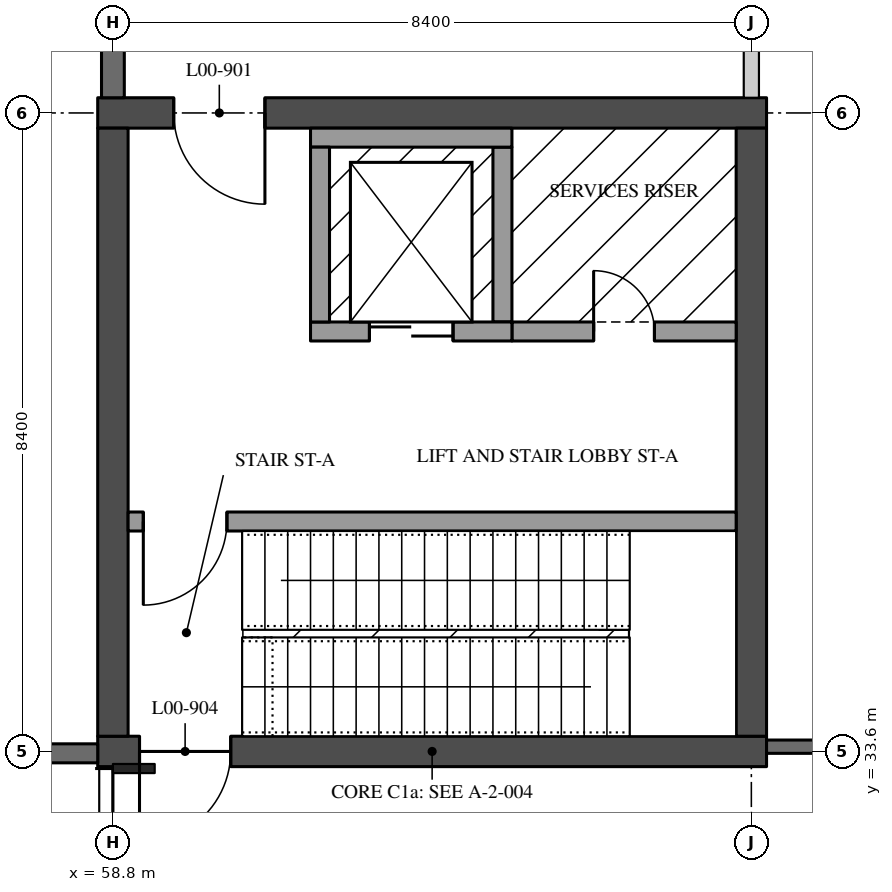
"""IFC4 building model, lengths in metres.
Left out: names, types, materials, properties, quantities, classifications, styles, units other than length and angle.
Written with IfcOpenShell. Run it as: python <this file> out.ifc"""

import sys

from ifc_helpers import new_model, si_unit, direction, frame, frame_2d, origin, place, context, subcontext, project, spatial, rectangle, extrude, element, fill, save


model = new_model("IFC4")
c1 = context("Model", 3, precision=1e-05, world=origin(), true_north=direction((0.0, 1.0)))
c2 = subcontext(c1, "Body", "Model", "MODEL_VIEW")
j1 = project(units=[si_unit("LENGTHUNIT", "METRE"), si_unit("PLANEANGLEUNIT", "RADIAN")], contexts=[c1])
p1 = place(None, origin())
s1 = spatial("IfcSite", under=j1, at=p1, CompositionType="ELEMENT")
p2 = place(p1, origin())
s2 = spatial("IfcBuilding", under=s1, at=p2, CompositionType="ELEMENT")
p3 = place(p2, origin())
s3 = spatial("IfcBuildingStorey", under=s2, at=p3, CompositionType="ELEMENT", Elevation=0.0)
p4 = place(p3, frame((58.6, 33.6, 0.0), z_axis=(0.0, 0.0, 1.0), x_axis=(1.0, 0.0, 0.0)))
e1 = element("IfcWall", 1, at=p4, inside=s3, PredefinedType="SHEAR", context=c2, shape_type="SweptSolid", body=[
    extrude(rectangle(XDim=8.8, YDim=0.4, at=frame_2d((4.4, 0.0))), origin(), (0.0, 0.0, 1.0), 5.05),
])
p5 = place(p4, frame((0.55, 0.0, 0.0)))
e2 = element("IfcOpeningElement", 2, at=p5, cuts=e1, PredefinedType="OPENING", context=c2, shape_type="SweptSolid", body=[
    extrude(rectangle(XDim=1.2, YDim=2.1, at=frame_2d((0.6, 1.05))), frame((0.0, 0.21, 0.0), z_axis=(0.0, -1.0, 0.0), x_axis=(1.0, 0.0, 0.0)), (0.0, 0.0, 1.0), 0.42),
])
p6 = place(p3, frame((58.6, 42.0, 0.0), z_axis=(0.0, 0.0, 1.0), x_axis=(1.0, 0.0, 0.0)))
e3 = element("IfcWall", 3, at=p6, inside=s3, PredefinedType="SHEAR", context=c2, shape_type="SweptSolid", body=[
    extrude(rectangle(XDim=8.8, YDim=0.4, at=frame_2d((4.4, 0.0))), origin(), (0.0, 0.0, 1.0), 5.05),
])
p7 = place(p6, frame((1.0, 0.0, 0.0)))
e4 = element("IfcOpeningElement", 4, at=p7, cuts=e3, PredefinedType="OPENING", context=c2, shape_type="SweptSolid", body=[
    extrude(rectangle(XDim=1.2, YDim=2.1, at=frame_2d((0.6, 1.05))), frame((0.0, 0.21, 0.0), z_axis=(0.0, -1.0, 0.0), x_axis=(1.0, 0.0, 0.0)), (0.0, 0.0, 1.0), 0.42),
])
for number, where, z_axis, x_axis in (
    (5, (58.8, 33.8, 0.0), (0.0, 0.0, 1.0), (0.0, 1.0, 0.0)),
    (6, (67.2, 33.8, 0.0), (0.0, 0.0, 1.0), (0.0, 1.0, 0.0)),
):
    element("IfcWall", number, at=place(p3, frame(where, z_axis=z_axis, x_axis=x_axis)), inside=s3, PredefinedType="SHEAR", context=c2, shape_type="SweptSolid", body=[
        extrude(rectangle(XDim=8.0, YDim=0.4, at=frame_2d((4.0, 0.0))), origin(), (0.0, 0.0, 1.0), 5.05),
    ])
p8 = place(p3, frame((59.0, 36.625, 0.0), z_axis=(0.0, 0.0, 1.0), x_axis=(1.0, 0.0, 0.0)))
e7 = element("IfcWall", 7, at=p8, inside=s3, PredefinedType="SOLIDWALL", context=c2, shape_type="SweptSolid", body=[
    extrude(rectangle(XDim=8.0, YDim=0.25, at=frame_2d((4.0, 0.0))), origin(), (0.0, 0.0, 1.0), 5.05),
])
p9 = place(p8, frame((0.2, 0.0, 0.0)))
e8 = element("IfcOpeningElement", 8, at=p9, cuts=e7, PredefinedType="OPENING", context=c2, shape_type="SweptSolid", body=[
    extrude(rectangle(XDim=1.1, YDim=2.1, at=frame_2d((0.55, 1.05))), frame((0.0, 0.135, 0.0), z_axis=(0.0, -1.0, 0.0), x_axis=(1.0, 0.0, 0.0)), (0.0, 0.0, 1.0), 0.27),
])
p10 = place(p3, frame((64.05, 39.125, 0.0), z_axis=(0.0, 0.0, 1.0), x_axis=(1.0, 0.0, 0.0)))
e9 = element("IfcWall", 9, at=p10, inside=s3, PredefinedType="SOLIDWALL", context=c2, shape_type="SweptSolid", body=[
    extrude(rectangle(XDim=2.95, YDim=0.25, at=frame_2d((1.475, 0.0))), origin(), (0.0, 0.0, 1.0), 5.05),
])
p11 = place(p10, frame((1.075, 0.0, 0.0)))
e10 = element("IfcOpeningElement", 10, at=p11, cuts=e9, PredefinedType="OPENING", context=c2, shape_type="SweptSolid", body=[
    extrude(rectangle(XDim=0.8, YDim=2.1, at=frame_2d((0.4, 1.05))), frame((0.0, 0.135, 0.0), z_axis=(0.0, -1.0, 0.0), x_axis=(1.0, 0.0, 0.0)), (0.0, 0.0, 1.0), 0.27),
])
p12 = place(p3, frame((63.925, 39.25, 0.0), z_axis=(0.0, 0.0, 1.0), x_axis=(0.0, 1.0, 0.0)))
e11 = element("IfcWall", 11, at=p12, inside=s3, PredefinedType="SOLIDWALL", context=c2, shape_type="SweptSolid", body=[
    extrude(rectangle(XDim=2.3, YDim=0.25, at=frame_2d((1.15, 0.0))), origin(), (0.0, 0.0, 1.0), 5.05),
])
p13 = place(p3, frame((61.4, 41.675, 0.0), z_axis=(0.0, 0.0, 1.0), x_axis=(1.0, 0.0, 0.0)))
e12 = element("IfcWall", 12, at=p13, inside=s3, PredefinedType="SOLIDWALL", context=c2, shape_type="SweptSolid", body=[
    extrude(rectangle(XDim=2.65, YDim=0.25, at=frame_2d((1.325, 0.0))), origin(), (0.0, 0.0, 1.0), 5.05),
])
p14 = place(p3, frame((61.4, 39.125, 0.0), z_axis=(0.0, 0.0, 1.0), x_axis=(1.0, 0.0, 0.0)))
e13 = element("IfcWall", 13, at=p14, inside=s3, PredefinedType="SOLIDWALL", context=c2, shape_type="SweptSolid", body=[
    extrude(rectangle(XDim=2.65, YDim=0.25, at=frame_2d((1.325, 0.0))), origin(), (0.0, 0.0, 1.0), 5.05),
])
p15 = place(p14, frame((0.775, 0.0, 0.0)))
e14 = element("IfcOpeningElement", 14, at=p15, cuts=e13, PredefinedType="OPENING", context=c2, shape_type="SweptSolid", body=[
    extrude(rectangle(XDim=1.1, YDim=2.1, at=frame_2d((0.55, 1.05))), frame((0.0, 0.135, 0.0), z_axis=(0.0, -1.0, 0.0), x_axis=(1.0, 0.0, 0.0)), (0.0, 0.0, 1.0), 0.27),
])
p16 = place(p3, frame((61.525, 39.25, 0.0), z_axis=(0.0, 0.0, 1.0), x_axis=(0.0, 1.0, 0.0)))
e15 = element("IfcWall", 15, at=p16, inside=s3, PredefinedType="SOLIDWALL", context=c2, shape_type="SweptSolid", body=[
    extrude(rectangle(XDim=2.3, YDim=0.25, at=frame_2d((1.15, 0.0))), origin(), (0.0, 0.0, 1.0), 5.05),
])
p17 = place(p3, frame((67.2, 42.2, 0.0), z_axis=(0.0, 0.0, 1.0), x_axis=(0.0, 1.0, 0.0)))
e16 = element("IfcWall", 16, at=p17, inside=s3, PredefinedType="PARTITIONING", context=c2, shape_type="SweptSolid", body=[
    extrude(rectangle(XDim=4.0, YDim=0.2, at=frame_2d((2.0, 0.0))), origin(), (0.0, 0.0, 1.0), 18.77),
])
p18 = place(p17, frame((1.5, 0.0, 0.0)))
e17 = element("IfcOpeningElement", 17, at=p18, cuts=e16, PredefinedType="OPENING", context=c2, shape_type="SweptSolid", body=[
    extrude(rectangle(XDim=1.0, YDim=2.4, at=frame_2d((0.5, 1.2))), frame((0.0, 0.11, 0.0), z_axis=(0.0, -1.0, 0.0), x_axis=(1.0, 0.0, 0.0)), (0.0, 0.0, 1.0), 0.22),
])
p19 = place(p3, frame((58.6, 33.575, 0.0), z_axis=(0.0, 0.0, 1.0), x_axis=(-1.0, 0.0, 0.0)))
e18 = element("IfcWall", 18, at=p19, inside=s3, PredefinedType="SOLIDWALL", context=c2, shape_type="SweptSolid", body=[
    extrude(rectangle(XDim=7.82, YDim=0.25, at=frame_2d((3.91, 0.0))), origin(), (0.0, 0.0, 1.0), 5.05),
])
p20 = place(p3, frame((58.8, 50.07, 0.0), z_axis=(0.0, 0.0, 1.0), x_axis=(0.0, -1.0, 0.0)))
e19 = element("IfcWall", 19, at=p20, inside=s3, PredefinedType="SOLIDWALL", context=c2, shape_type="SweptSolid", body=[
    extrude(rectangle(XDim=7.87, YDim=0.3, at=frame_2d((3.935, 0.0))), origin(), (0.0, 0.0, 1.0), 5.05),
])
p21 = place(p20, frame((4.77, 0.0, 2.25)))
e20 = element("IfcOpeningElement", 20, at=p21, cuts=e19, PredefinedType="OPENING", context=c2, shape_type="SweptSolid", body=[
    extrude(rectangle(XDim=2.4, YDim=1.8, at=frame_2d((1.2, 0.9))), frame((0.0, 0.16, 0.0), z_axis=(0.0, -1.0, 0.0), x_axis=(1.0, 0.0, 0.0)), (0.0, 0.0, 1.0), 0.32),
])
p22 = place(p3, frame((67.4, 33.663, 0.0), z_axis=(0.0, 0.0, 1.0), x_axis=(1.0, 0.0, 0.0)))
e21 = element("IfcWall", 21, at=p22, inside=s3, PredefinedType="SOLIDWALL", context=c2, shape_type="SweptSolid", body=[
    extrude(rectangle(XDim=7.87, YDim=0.175, at=frame_2d((3.935, 0.0))), origin(), (0.0, 0.0, 1.0), 5.4),
])
p23 = place(p22, frame((0.7, 0.0, 0.0)))
e22 = element("IfcOpeningElement", 22, at=p23, cuts=e21, PredefinedType="OPENING", context=c2, shape_type="SweptSolid", body=[
    extrude(rectangle(XDim=2.4, YDim=2.7, at=frame_2d((1.2, 1.35))), frame((0.0, 0.098, 0.0), z_axis=(0.0, -1.0, 0.0), x_axis=(1.0, 0.0, 0.0)), (0.0, 0.0, 1.0), 0.195),
])
p24 = place(p22, frame((4.9, 0.0, 0.0)))
e23 = element("IfcOpeningElement", 23, at=p24, cuts=e21, PredefinedType="OPENING", context=c2, shape_type="SweptSolid", body=[
    extrude(rectangle(XDim=2.4, YDim=2.7, at=frame_2d((1.2, 1.35))), frame((0.0, 0.098, 0.0), z_axis=(0.0, -1.0, 0.0), x_axis=(1.0, 0.0, 0.0)), (0.0, 0.0, 1.0), 0.195),
])
p25 = place(p7, frame((1.2, 0.0, 0.0), z_axis=(0.0, 0.0, 1.0), x_axis=(-1.0, 0.0, 0.0)))
e24 = element("IfcDoor", 24, at=p25, inside=s3, OperationType="SINGLE_SWING_RIGHT", PredefinedType="DOOR", context=c2, shape_type="SweptSolid", body=[
    extrude(rectangle(XDim=1.2, YDim=2.1, at=frame_2d((0.6, 1.05))), frame((0.0, 0.035, 0.0), z_axis=(0.0, -1.0, 0.0), x_axis=(1.0, 0.0, 0.0)), (0.0, 0.0, 1.0), 0.07),
])
fill(e4, e24)
p26 = place(p11, origin())
e25 = element("IfcDoor", 25, at=p26, inside=s3, OperationType="SINGLE_SWING_RIGHT", PredefinedType="DOOR", context=c2, shape_type="SweptSolid", body=[
    extrude(rectangle(XDim=0.8, YDim=2.1, at=frame_2d((0.4, 1.05))), frame((0.0, 0.035, 0.0), z_axis=(0.0, -1.0, 0.0), x_axis=(1.0, 0.0, 0.0)), (0.0, 0.0, 1.0), 0.07),
])
fill(e10, e25)
p27 = place(p9, frame((1.1, 0.0, 0.0), z_axis=(0.0, 0.0, 1.0), x_axis=(-1.0, 0.0, 0.0)))
e26 = element("IfcDoor", 26, at=p27, inside=s3, OperationType="SINGLE_SWING_LEFT", PredefinedType="DOOR", context=c2, shape_type="SweptSolid", body=[
    extrude(rectangle(XDim=1.1, YDim=2.1, at=frame_2d((0.55, 1.05))), frame((0.0, 0.035, 0.0), z_axis=(0.0, -1.0, 0.0), x_axis=(1.0, 0.0, 0.0)), (0.0, 0.0, 1.0), 0.07),
])
fill(e8, e26)
p28 = place(p5, frame((1.2, 0.0, 0.0), z_axis=(0.0, 0.0, 1.0), x_axis=(-1.0, 0.0, 0.0)))
e27 = element("IfcDoor", 27, at=p28, inside=s3, OperationType="SINGLE_SWING_LEFT", PredefinedType="DOOR", context=c2, shape_type="SweptSolid", body=[
    extrude(rectangle(XDim=1.2, YDim=2.1, at=frame_2d((0.6, 1.05))), frame((0.0, 0.035, 0.0), z_axis=(0.0, -1.0, 0.0), x_axis=(1.0, 0.0, 0.0)), (0.0, 0.0, 1.0), 0.07),
])
fill(e2, e27)
p29 = place(p15, origin())
e28 = element("IfcDoor", 28, at=p29, inside=s3, OperationType="DOUBLE_DOOR_SLIDING", PredefinedType="DOOR", context=c2, shape_type="SweptSolid", body=[
    extrude(rectangle(XDim=1.1, YDim=2.1, at=frame_2d((0.55, 1.05))), frame((0.0, 0.04, 0.0), z_axis=(0.0, -1.0, 0.0), x_axis=(1.0, 0.0, 0.0)), (0.0, 0.0, 1.0), 0.08),
])
fill(e14, e28)
save(model, sys.argv[1])
